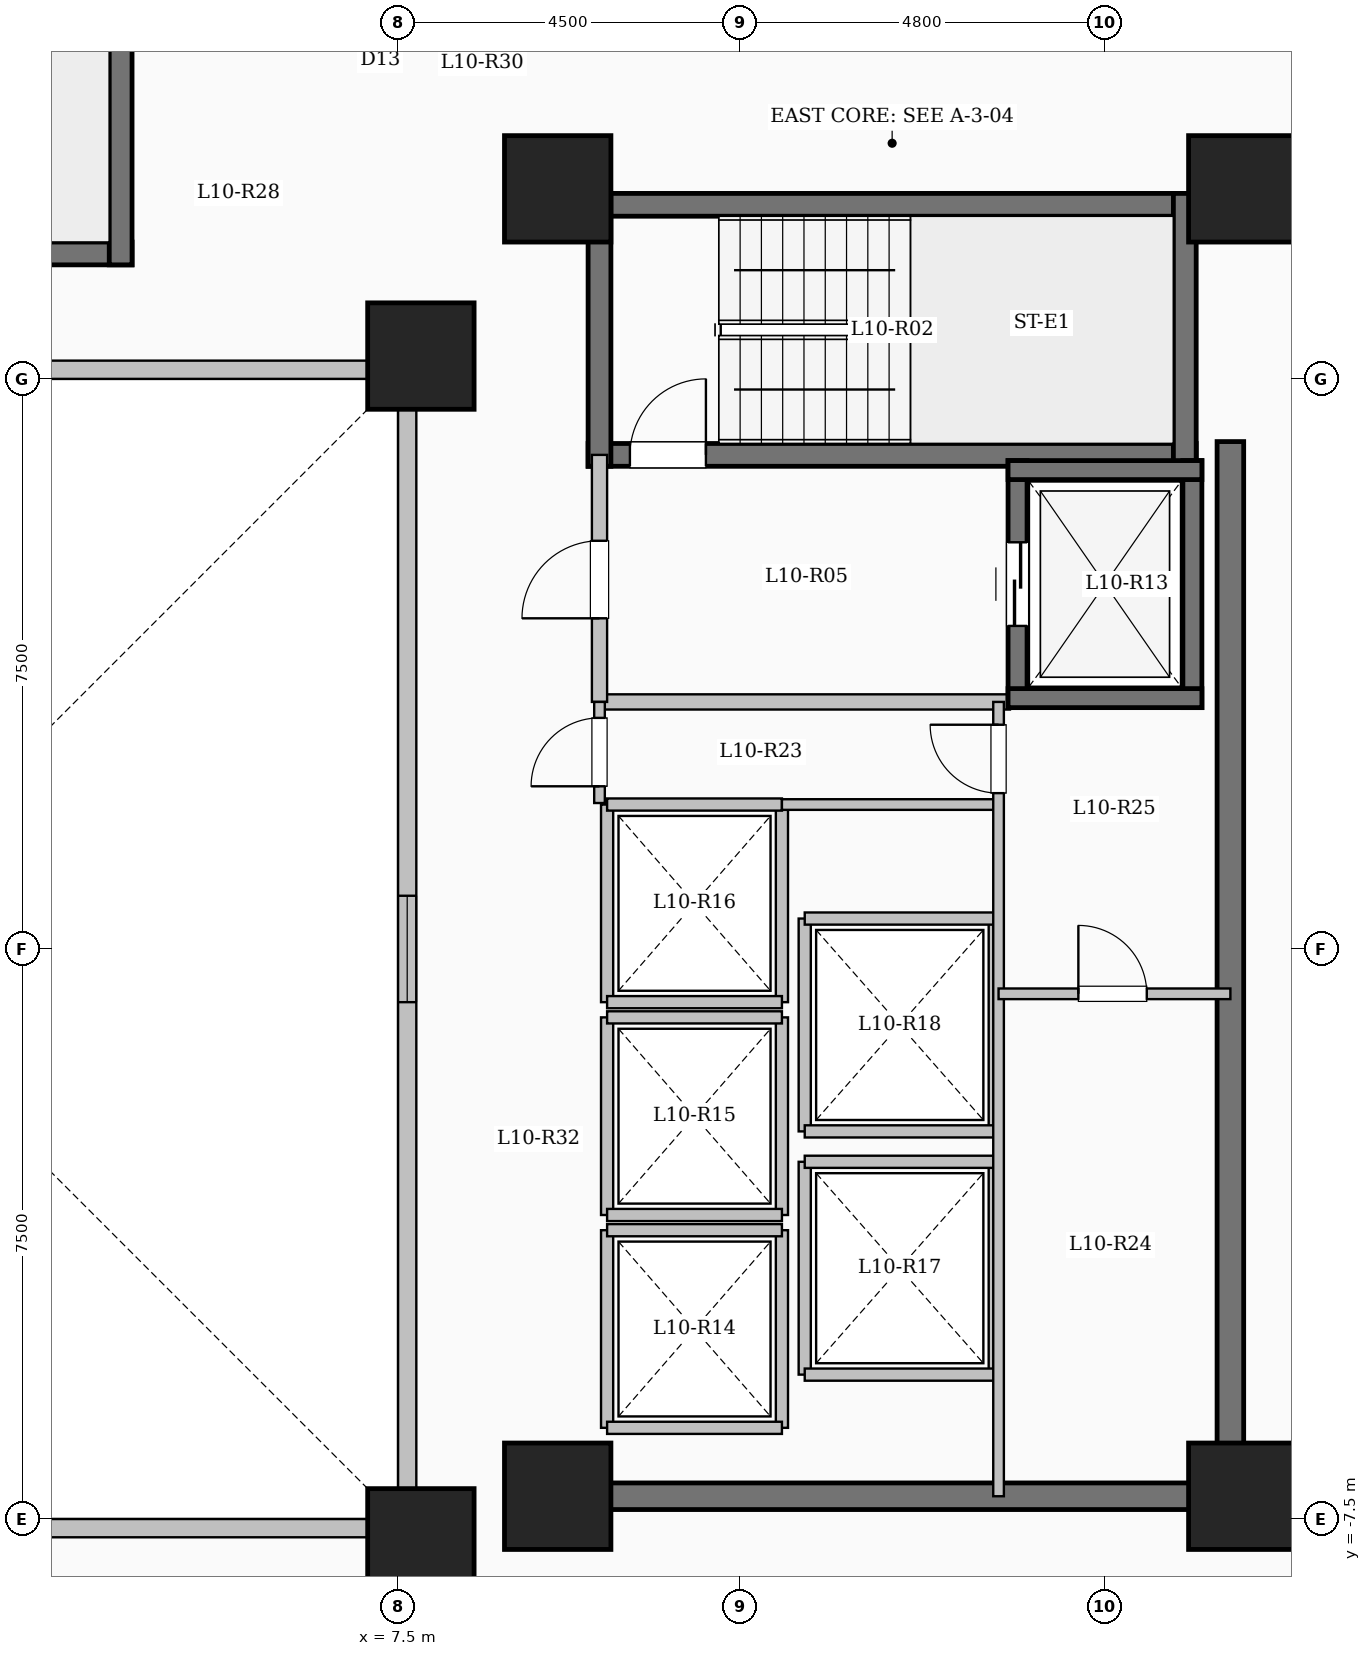
"""IFC4 building model, lengths in metres.
Left out: names, types, materials, properties, quantities, classifications, styles, units other than length and angle.
Written with IfcOpenShell. Run it as: python <this file> out.ifc"""

import sys

from ifc_helpers import new_model, si_unit, direction, frame, frame_2d, origin, origin_2d, place, context, subcontext, project, spatial, rectangle, extrude, element, fill, save


model = new_model("IFC4")
c1 = context("Model", 3, precision=1e-05, world=origin(), true_north=direction((0.0, 1.0)))
c2 = subcontext(c1, "Body", "Model", "MODEL_VIEW")
j1 = project(units=[si_unit("LENGTHUNIT", "METRE"), si_unit("PLANEANGLEUNIT", "RADIAN")], contexts=[c1])
p1 = place(None, origin())
s1 = spatial("IfcSite", under=j1, at=p1, CompositionType="ELEMENT")
p2 = place(p1, origin())
s2 = spatial("IfcBuilding", under=s1, at=p2, CompositionType="ELEMENT")
p3 = place(p2, frame((0.0, 0.0, 40.75)))
s3 = spatial("IfcBuildingStorey", under=s2, at=p3, CompositionType="ELEMENT", Elevation=40.75)
for number, where, z_axis, x_axis in (
    (1, (7.8, -7.8, 0.0), (0.0, 0.0, 1.0), (1.0, 0.0, 0.0)),
    (2, (7.8, 7.8, 0.0), (0.0, 0.0, 1.0), (1.0, 0.0, 0.0)),
    (3, (9.6, -7.2, 0.0), (0.0, 0.0, 1.0), (1.0, 0.0, 0.0)),
    (4, (9.6, 10.0, 0.0), (0.0, 0.0, 1.0), (1.0, 0.0, 0.0)),
    (5, (18.6, -7.2, 0.0), (0.0, 0.0, 1.0), (1.0, 0.0, 0.0)),
    (6, (18.6, 10.0, 0.0), (0.0, 0.0, 1.0), (1.0, 0.0, 0.0)),
):
    element("IfcColumn", number, at=place(p3, frame(where, z_axis=z_axis, x_axis=x_axis)), inside=s3, PredefinedType="COLUMN", context=c2, shape_type="SweptSolid", body=[
        extrude(rectangle(XDim=1.4, YDim=1.4, at=origin_2d()), origin(), (0.0, 0.0, 1.0), 3.35),
    ])
p4 = place(p3, frame((-7.62, -7.62, 0.0), z_axis=(0.0, 0.0, 1.0), x_axis=(1.0, 0.0, 0.0)))
e7 = element("IfcWall", 7, at=p4, inside=s3, PredefinedType="SOLIDWALL", context=c2, shape_type="SweptSolid", body=[
    extrude(rectangle(XDim=15.24, YDim=0.24, at=frame_2d((7.62, 0.0))), origin(), (0.0, 0.0, 1.0), 3.1),
])
p5 = place(p4, frame((6.92, 0.0, 0.95)))
e8 = element("IfcOpeningElement", 8, at=p5, cuts=e7, PredefinedType="OPENING", context=c2, shape_type="SweptSolid", body=[
    extrude(rectangle(XDim=1.4, YDim=1.5, at=frame_2d((0.7, 0.75))), frame((0.0, 0.13, 0.0), z_axis=(0.0, -1.0, 0.0), x_axis=(1.0, 0.0, 0.0)), (0.0, 0.0, 1.0), 0.26),
])
p6 = place(p3, frame((7.62, -7.62, 0.0), z_axis=(0.0, 0.0, 1.0), x_axis=(0.0, 1.0, 0.0)))
e9 = element("IfcWall", 9, at=p6, inside=s3, PredefinedType="SOLIDWALL", context=c2, shape_type="SweptSolid", body=[
    extrude(rectangle(XDim=15.24, YDim=0.24, at=frame_2d((7.62, 0.0))), origin(), (0.0, 0.0, 1.0), 3.1),
])
p7 = place(p6, frame((6.92, 0.0, 0.95)))
e10 = element("IfcOpeningElement", 10, at=p7, cuts=e9, PredefinedType="OPENING", context=c2, shape_type="SweptSolid", body=[
    extrude(rectangle(XDim=1.4, YDim=1.5, at=frame_2d((0.7, 0.75))), frame((0.0, 0.13, 0.0), z_axis=(0.0, -1.0, 0.0), x_axis=(1.0, 0.0, 0.0)), (0.0, 0.0, 1.0), 0.26),
])
p8 = place(p3, frame((7.62, 7.62, 0.0), z_axis=(0.0, 0.0, 1.0), x_axis=(-1.0, 0.0, 0.0)))
e11 = element("IfcWall", 11, at=p8, inside=s3, PredefinedType="SOLIDWALL", context=c2, shape_type="SweptSolid", body=[
    extrude(rectangle(XDim=15.24, YDim=0.24, at=frame_2d((7.62, 0.0))), origin(), (0.0, 0.0, 1.0), 3.1),
])
p9 = place(p8, frame((6.92, 0.0, 0.95)))
e12 = element("IfcOpeningElement", 12, at=p9, cuts=e11, PredefinedType="OPENING", context=c2, shape_type="SweptSolid", body=[
    extrude(rectangle(XDim=1.4, YDim=1.5, at=frame_2d((0.7, 0.75))), frame((0.0, 0.13, 0.0), z_axis=(0.0, -1.0, 0.0), x_axis=(1.0, 0.0, 0.0)), (0.0, 0.0, 1.0), 0.26),
])
p10 = place(p3, frame((10.0, 9.79, 0.0), z_axis=(0.0, 0.0, 1.0), x_axis=(1.0, 0.0, 0.0)))
e13 = element("IfcWall", 13, at=p10, inside=s3, PredefinedType="SHEAR", context=c2, shape_type="SweptSolid", body=[
    extrude(rectangle(XDim=8.0, YDim=0.3, at=frame_2d((4.0, 0.0))), origin(), (0.0, 0.0, 1.0), 3.35),
])
p11 = place(p3, frame((10.0, 6.5, 0.0), z_axis=(0.0, 0.0, 1.0), x_axis=(1.0, 0.0, 0.0)))
e14 = element("IfcWall", 14, at=p11, inside=s3, PredefinedType="SHEAR", context=c2, shape_type="SweptSolid", body=[
    extrude(rectangle(XDim=8.0, YDim=0.3, at=frame_2d((4.0, 0.0))), origin(), (0.0, 0.0, 1.0), 3.35),
])
p12 = place(p11, frame((0.55, 0.0, 0.0)))
e15 = element("IfcOpeningElement", 15, at=p12, cuts=e14, PredefinedType="OPENING", context=c2, shape_type="SweptSolid", body=[
    extrude(rectangle(XDim=1.0, YDim=2.15, at=frame_2d((0.5, 1.075))), frame((0.0, 0.16, 0.0), z_axis=(0.0, -1.0, 0.0), x_axis=(1.0, 0.0, 0.0)), (0.0, 0.0, 1.0), 0.32),
])
for number, where, z_axis, x_axis in (
    (16, (10.15, 6.35, 0.0), (0.0, 0.0, 1.0), (0.0, 1.0, 0.0)),
    (17, (17.85, 6.35, 0.0), (0.0, 0.0, 1.0), (0.0, 1.0, 0.0)),
):
    element("IfcWall", number, at=place(p3, frame(where, z_axis=z_axis, x_axis=x_axis)), inside=s3, PredefinedType="SHEAR", context=c2, shape_type="SweptSolid", body=[
        extrude(rectangle(XDim=3.59, YDim=0.3, at=frame_2d((1.795, 0.0))), origin(), (0.0, 0.0, 1.0), 3.35),
    ])
p13 = place(p3, frame((-4.0, 9.15, 0.0), z_axis=(0.0, 0.0, 1.0), x_axis=(1.0, 0.0, 0.0)))
e18 = element("IfcWall", 18, at=p13, inside=s3, PredefinedType="SHEAR", context=c2, shape_type="SweptSolid", body=[
    extrude(rectangle(XDim=8.0, YDim=0.3, at=frame_2d((4.0, 0.0))), origin(), (0.0, 0.0, 1.0), 3.35),
])
p14 = place(p13, frame((0.55, 0.0, 0.0)))
e19 = element("IfcOpeningElement", 19, at=p14, cuts=e18, PredefinedType="OPENING", context=c2, shape_type="SweptSolid", body=[
    extrude(rectangle(XDim=1.0, YDim=2.15, at=frame_2d((0.5, 1.075))), frame((0.0, 0.16, 0.0), z_axis=(0.0, -1.0, 0.0), x_axis=(1.0, 0.0, 0.0)), (0.0, 0.0, 1.0), 0.32),
])
p15 = place(p3, frame((3.85, 9.0, 0.0), z_axis=(0.0, 0.0, 1.0), x_axis=(0.0, 1.0, 0.0)))
e20 = element("IfcWall", 20, at=p15, inside=s3, PredefinedType="SHEAR", context=c2, shape_type="SweptSolid", body=[
    extrude(rectangle(XDim=3.59, YDim=0.3, at=frame_2d((1.795, 0.0))), origin(), (0.0, 0.0, 1.0), 3.35),
])
p16 = place(p3, frame((10.15, 3.25, 0.0), z_axis=(0.0, 0.0, 1.0), x_axis=(1.0, 0.0, 0.0)))
e21 = element("IfcWall", 21, at=p16, inside=s3, PredefinedType="SOLIDWALL", context=c2, shape_type="SweptSolid", body=[
    extrude(rectangle(XDim=5.4, YDim=0.2, at=frame_2d((2.7, 0.0))), origin(), (0.0, 0.0, 1.0), 3.1),
])
p17 = place(p3, frame((10.15, 3.25, 0.0), z_axis=(0.0, 0.0, 1.0), x_axis=(0.0, 1.0, 0.0)))
e22 = element("IfcWall", 22, at=p17, inside=s3, PredefinedType="SOLIDWALL", context=c2, shape_type="SweptSolid", body=[
    extrude(rectangle(XDim=3.25, YDim=0.2, at=frame_2d((1.625, 0.0))), origin(), (0.0, 0.0, 1.0), 3.1),
])
p18 = place(p17, frame((1.1, 0.0, 0.0)))
e23 = element("IfcOpeningElement", 23, at=p18, cuts=e22, PredefinedType="OPENING", context=c2, shape_type="SweptSolid", body=[
    extrude(rectangle(XDim=1.02, YDim=2.15, at=frame_2d((0.51, 1.075))), frame((0.0, 0.11, 0.0), z_axis=(0.0, -1.0, 0.0), x_axis=(1.0, 0.0, 0.0)), (0.0, 0.0, 1.0), 0.22),
])
p19 = place(p3, frame((15.65, 3.175, 0.0), z_axis=(0.0, 0.0, 1.0), x_axis=(0.0, 1.0, 0.0)))
e24 = element("IfcWall", 24, at=p19, inside=s3, PredefinedType="SHEAR", context=c2, shape_type="SweptSolid", body=[
    extrude(rectangle(XDim=3.25, YDim=0.25, at=frame_2d((1.625, 0.0))), origin(), (0.0, 0.0, 1.0), 3.35),
])
p20 = place(p19, frame((1.075, 0.0, 0.0)))
e25 = element("IfcOpeningElement", 25, at=p20, cuts=e24, PredefinedType="OPENING", context=c2, shape_type="SweptSolid", body=[
    extrude(rectangle(XDim=1.1, YDim=2.15, at=frame_2d((0.55, 1.075))), frame((0.0, 0.135, 0.0), z_axis=(0.0, -1.0, 0.0), x_axis=(1.0, 0.0, 0.0)), (0.0, 0.0, 1.0), 0.27),
])
p21 = place(p3, frame((17.95, 3.175, 0.0), z_axis=(0.0, 0.0, 1.0), x_axis=(0.0, 1.0, 0.0)))
e26 = element("IfcWall", 26, at=p21, inside=s3, PredefinedType="SHEAR", context=c2, shape_type="SweptSolid", body=[
    extrude(rectangle(XDim=3.25, YDim=0.25, at=frame_2d((1.625, 0.0))), origin(), (0.0, 0.0, 1.0), 3.35),
])
for number, where, z_axis, x_axis in (
    (27, (15.525, 3.3, 0.0), (0.0, 0.0, 1.0), (1.0, 0.0, 0.0)),
    (28, (15.525, 6.3, 0.0), (0.0, 0.0, 1.0), (1.0, 0.0, 0.0)),
):
    element("IfcWall", number, at=place(p3, frame(where, z_axis=z_axis, x_axis=x_axis)), inside=s3, PredefinedType="SHEAR", context=c2, shape_type="SweptSolid", body=[
        extrude(rectangle(XDim=2.55, YDim=0.25, at=frame_2d((1.275, 0.0))), origin(), (0.0, 0.0, 1.0), 3.35),
    ])
for number, where, z_axis, x_axis in (
    (29, (10.25, -6.3, 0.0), (0.0, 0.0, 1.0), (0.0, 1.0, 0.0)),
    (30, (12.55, -6.3, 0.0), (0.0, 0.0, 1.0), (0.0, 1.0, 0.0)),
):
    element("IfcWall", number, at=place(p3, frame(where, z_axis=z_axis, x_axis=x_axis)), inside=s3, PredefinedType="SOLIDWALL", context=c2, shape_type="SweptSolid", body=[
        extrude(rectangle(XDim=2.6, YDim=0.16, at=frame_2d((1.3, 0.0))), origin(), (0.0, 0.0, 1.0), 3.1),
    ])
for number, where, z_axis, x_axis in (
    (31, (10.25, -6.3, 0.0), (0.0, 0.0, 1.0), (1.0, 0.0, 0.0)),
    (32, (10.25, -3.7, 0.0), (0.0, 0.0, 1.0), (1.0, 0.0, 0.0)),
):
    element("IfcWall", number, at=place(p3, frame(where, z_axis=z_axis, x_axis=x_axis)), inside=s3, PredefinedType="SOLIDWALL", context=c2, shape_type="SweptSolid", body=[
        extrude(rectangle(XDim=2.3, YDim=0.16, at=frame_2d((1.15, 0.0))), origin(), (0.0, 0.0, 1.0), 3.1),
    ])
for number, where, z_axis, x_axis in (
    (33, (10.25, -3.5, 0.0), (0.0, 0.0, 1.0), (0.0, 1.0, 0.0)),
    (34, (12.55, -3.5, 0.0), (0.0, 0.0, 1.0), (0.0, 1.0, 0.0)),
):
    element("IfcWall", number, at=place(p3, frame(where, z_axis=z_axis, x_axis=x_axis)), inside=s3, PredefinedType="SOLIDWALL", context=c2, shape_type="SweptSolid", body=[
        extrude(rectangle(XDim=2.6, YDim=0.16, at=frame_2d((1.3, 0.0))), origin(), (0.0, 0.0, 1.0), 3.1),
    ])
for number, where, z_axis, x_axis in (
    (35, (10.25, -3.5, 0.0), (0.0, 0.0, 1.0), (1.0, 0.0, 0.0)),
    (36, (10.25, -0.9, 0.0), (0.0, 0.0, 1.0), (1.0, 0.0, 0.0)),
):
    element("IfcWall", number, at=place(p3, frame(where, z_axis=z_axis, x_axis=x_axis)), inside=s3, PredefinedType="SOLIDWALL", context=c2, shape_type="SweptSolid", body=[
        extrude(rectangle(XDim=2.3, YDim=0.16, at=frame_2d((1.15, 0.0))), origin(), (0.0, 0.0, 1.0), 3.1),
    ])
for number, where, z_axis, x_axis in (
    (37, (10.25, -0.7, 0.0), (0.0, 0.0, 1.0), (0.0, 1.0, 0.0)),
    (38, (12.55, -0.7, 0.0), (0.0, 0.0, 1.0), (0.0, 1.0, 0.0)),
):
    element("IfcWall", number, at=place(p3, frame(where, z_axis=z_axis, x_axis=x_axis)), inside=s3, PredefinedType="SOLIDWALL", context=c2, shape_type="SweptSolid", body=[
        extrude(rectangle(XDim=2.6, YDim=0.16, at=frame_2d((1.3, 0.0))), origin(), (0.0, 0.0, 1.0), 3.1),
    ])
for number, where, z_axis, x_axis in (
    (39, (10.25, -0.7, 0.0), (0.0, 0.0, 1.0), (1.0, 0.0, 0.0)),
    (40, (10.25, 1.9, 0.0), (0.0, 0.0, 1.0), (1.0, 0.0, 0.0)),
):
    element("IfcWall", number, at=place(p3, frame(where, z_axis=z_axis, x_axis=x_axis)), inside=s3, PredefinedType="SOLIDWALL", context=c2, shape_type="SweptSolid", body=[
        extrude(rectangle(XDim=2.3, YDim=0.16, at=frame_2d((1.15, 0.0))), origin(), (0.0, 0.0, 1.0), 3.1),
    ])
for number, where, z_axis, x_axis in (
    (41, (12.85, -5.6, 0.0), (0.0, 0.0, 1.0), (0.0, 1.0, 0.0)),
    (42, (15.35, -5.6, 0.0), (0.0, 0.0, 1.0), (0.0, 1.0, 0.0)),
):
    element("IfcWall", number, at=place(p3, frame(where, z_axis=z_axis, x_axis=x_axis)), inside=s3, PredefinedType="SOLIDWALL", context=c2, shape_type="SweptSolid", body=[
        extrude(rectangle(XDim=2.8, YDim=0.16, at=frame_2d((1.4, 0.0))), origin(), (0.0, 0.0, 1.0), 3.1),
    ])
for number, where, z_axis, x_axis in (
    (43, (12.85, -5.6, 0.0), (0.0, 0.0, 1.0), (1.0, 0.0, 0.0)),
    (44, (12.85, -2.8, 0.0), (0.0, 0.0, 1.0), (1.0, 0.0, 0.0)),
):
    element("IfcWall", number, at=place(p3, frame(where, z_axis=z_axis, x_axis=x_axis)), inside=s3, PredefinedType="SOLIDWALL", context=c2, shape_type="SweptSolid", body=[
        extrude(rectangle(XDim=2.5, YDim=0.16, at=frame_2d((1.25, 0.0))), origin(), (0.0, 0.0, 1.0), 3.1),
    ])
for number, where, z_axis, x_axis in (
    (45, (12.85, -2.4, 0.0), (0.0, 0.0, 1.0), (0.0, 1.0, 0.0)),
    (46, (15.35, -2.4, 0.0), (0.0, 0.0, 1.0), (0.0, 1.0, 0.0)),
):
    element("IfcWall", number, at=place(p3, frame(where, z_axis=z_axis, x_axis=x_axis)), inside=s3, PredefinedType="SOLIDWALL", context=c2, shape_type="SweptSolid", body=[
        extrude(rectangle(XDim=2.8, YDim=0.16, at=frame_2d((1.4, 0.0))), origin(), (0.0, 0.0, 1.0), 3.1),
    ])
for number, where, z_axis, x_axis in (
    (47, (12.85, -2.4, 0.0), (0.0, 0.0, 1.0), (1.0, 0.0, 0.0)),
    (48, (12.85, 0.4, 0.0), (0.0, 0.0, 1.0), (1.0, 0.0, 0.0)),
):
    element("IfcWall", number, at=place(p3, frame(where, z_axis=z_axis, x_axis=x_axis)), inside=s3, PredefinedType="SOLIDWALL", context=c2, shape_type="SweptSolid", body=[
        extrude(rectangle(XDim=2.5, YDim=0.16, at=frame_2d((1.25, 0.0))), origin(), (0.0, 0.0, 1.0), 3.1),
    ])
p22 = place(p3, frame((18.45, -7.375, 0.0), z_axis=(0.0, 0.0, 1.0), x_axis=(0.0, 1.0, 0.0)))
e49 = element("IfcWall", 49, at=p22, inside=s3, PredefinedType="SHEAR", context=c2, shape_type="SweptSolid", body=[
    extrude(rectangle(XDim=14.05, YDim=0.35, at=frame_2d((7.025, 0.0))), origin(), (0.0, 0.0, 1.0), 3.35),
])
p23 = place(p3, frame((10.075, -7.2, 0.0), z_axis=(0.0, 0.0, 1.0), x_axis=(1.0, 0.0, 0.0)))
e50 = element("IfcWall", 50, at=p23, inside=s3, PredefinedType="SHEAR", context=c2, shape_type="SweptSolid", body=[
    extrude(rectangle(XDim=8.55, YDim=0.35, at=frame_2d((4.275, 0.0))), origin(), (0.0, 0.0, 1.0), 3.35),
])
p24 = place(p3, frame((12.55, 1.9, 0.0), z_axis=(0.0, 0.0, 1.0), x_axis=(1.0, 0.0, 0.0)))
e51 = element("IfcWall", 51, at=p24, inside=s3, PredefinedType="PARTITIONING", context=c2, shape_type="SweptSolid", body=[
    extrude(rectangle(XDim=2.85, YDim=0.14, at=frame_2d((1.425, 0.0))), origin(), (0.0, 0.0, 1.0), 3.1),
])
p25 = place(p3, frame((10.15, 1.92, 0.0), z_axis=(0.0, 0.0, 1.0), x_axis=(0.0, 1.0, 0.0)))
e52 = element("IfcWall", 52, at=p25, inside=s3, PredefinedType="PARTITIONING", context=c2, shape_type="SweptSolid", body=[
    extrude(rectangle(XDim=1.33, YDim=0.14, at=frame_2d((0.665, 0.0))), origin(), (0.0, 0.0, 1.0), 3.1),
])
p26 = place(p25, frame((0.22, 0.0, 0.0)))
e53 = element("IfcOpeningElement", 53, at=p26, cuts=e52, PredefinedType="OPENING", context=c2, shape_type="SweptSolid", body=[
    extrude(rectangle(XDim=0.9, YDim=2.08, at=frame_2d((0.45, 1.04))), frame((0.0, 0.08, 0.0), z_axis=(0.0, -1.0, 0.0), x_axis=(1.0, 0.0, 0.0)), (0.0, 0.0, 1.0), 0.16),
])
p27 = place(p3, frame((15.4, -7.2, 0.0), z_axis=(0.0, 0.0, 1.0), x_axis=(0.0, 1.0, 0.0)))
e54 = element("IfcWall", 54, at=p27, inside=s3, PredefinedType="PARTITIONING", context=c2, shape_type="SweptSolid", body=[
    extrude(rectangle(XDim=10.45, YDim=0.14, at=frame_2d((5.225, 0.0))), origin(), (0.0, 0.0, 1.0), 3.1),
])
p28 = place(p27, frame((9.25, 0.0, 0.0)))
e55 = element("IfcOpeningElement", 55, at=p28, cuts=e54, PredefinedType="OPENING", context=c2, shape_type="SweptSolid", body=[
    extrude(rectangle(XDim=0.9, YDim=2.08, at=frame_2d((0.45, 1.04))), frame((0.0, 0.08, 0.0), z_axis=(0.0, -1.0, 0.0), x_axis=(1.0, 0.0, 0.0)), (0.0, 0.0, 1.0), 0.16),
])
p29 = place(p3, frame((15.4, -0.59, 0.0), z_axis=(0.0, 0.0, 1.0), x_axis=(1.0, 0.0, 0.0)))
e56 = element("IfcWall", 56, at=p29, inside=s3, PredefinedType="PARTITIONING", context=c2, shape_type="SweptSolid", body=[
    extrude(rectangle(XDim=3.05, YDim=0.14, at=frame_2d((1.525, 0.0))), origin(), (0.0, 0.0, 1.0), 3.1),
])
p30 = place(p29, frame((1.05, 0.0, 0.0)))
e57 = element("IfcOpeningElement", 57, at=p30, cuts=e56, PredefinedType="OPENING", context=c2, shape_type="SweptSolid", body=[
    extrude(rectangle(XDim=0.9, YDim=2.08, at=frame_2d((0.45, 1.04))), frame((0.0, 0.08, 0.0), z_axis=(0.0, -1.0, 0.0), x_axis=(1.0, 0.0, 0.0)), (0.0, 0.0, 1.0), 0.16),
])
p31 = place(p7, origin())
e58 = element("IfcWindow", 58, at=p31, inside=s3, PartitioningType="SINGLE_PANEL", PredefinedType="WINDOW", context=c2, shape_type="SweptSolid", body=[
    extrude(rectangle(XDim=1.4, YDim=1.5, at=frame_2d((0.7, 0.75))), frame((0.0, 0.03, 0.0), z_axis=(0.0, -1.0, 0.0), x_axis=(1.0, 0.0, 0.0)), (0.0, 0.0, 1.0), 0.06),
])
fill(e10, e58)
p32 = place(p12, origin())
e59 = element("IfcDoor", 59, at=p32, inside=s3, OperationType="SINGLE_SWING_RIGHT", PredefinedType="DOOR", context=c2, shape_type="SweptSolid", body=[
    extrude(rectangle(XDim=1.0, YDim=2.15, at=frame_2d((0.5, 1.075))), frame((0.0, 0.025, 0.0), z_axis=(0.0, -1.0, 0.0), x_axis=(1.0, 0.0, 0.0)), (0.0, 0.0, 1.0), 0.05),
])
fill(e15, e59)
p33 = place(p18, origin())
e60 = element("IfcDoor", 60, at=p33, inside=s3, OperationType="SINGLE_SWING_LEFT", PredefinedType="DOOR", context=c2, shape_type="SweptSolid", body=[
    extrude(rectangle(XDim=1.02, YDim=2.15, at=frame_2d((0.51, 1.075))), frame((0.0, 0.025, 0.0), z_axis=(0.0, -1.0, 0.0), x_axis=(1.0, 0.0, 0.0)), (0.0, 0.0, 1.0), 0.05),
])
fill(e23, e60)
p34 = place(p20, origin())
e61 = element("IfcDoor", 61, at=p34, inside=s3, OperationType="SLIDING_TO_LEFT", PredefinedType="DOOR", context=c2, shape_type="SweptSolid", body=[
    extrude(rectangle(XDim=1.1, YDim=2.15, at=frame_2d((0.55, 1.075))), frame((0.0, 0.025, 0.0), z_axis=(0.0, -1.0, 0.0), x_axis=(1.0, 0.0, 0.0)), (0.0, 0.0, 1.0), 0.05),
])
fill(e25, e61)
p35 = place(p26, origin())
e62 = element("IfcDoor", 62, at=p35, inside=s3, OperationType="SINGLE_SWING_LEFT", PredefinedType="DOOR", context=c2, shape_type="SweptSolid", body=[
    extrude(rectangle(XDim=0.9, YDim=2.08, at=frame_2d((0.45, 1.04))), frame((0.0, 0.025, 0.0), z_axis=(0.0, -1.0, 0.0), x_axis=(1.0, 0.0, 0.0)), (0.0, 0.0, 1.0), 0.05),
])
fill(e53, e62)
p36 = place(p28, origin())
e63 = element("IfcDoor", 63, at=p36, inside=s3, OperationType="SINGLE_SWING_RIGHT", PredefinedType="DOOR", context=c2, shape_type="SweptSolid", body=[
    extrude(rectangle(XDim=0.9, YDim=2.08, at=frame_2d((0.45, 1.04))), frame((0.0, 0.025, 0.0), z_axis=(0.0, -1.0, 0.0), x_axis=(1.0, 0.0, 0.0)), (0.0, 0.0, 1.0), 0.05),
])
fill(e55, e63)
p37 = place(p30, origin())
e64 = element("IfcDoor", 64, at=p37, inside=s3, OperationType="SINGLE_SWING_LEFT", PredefinedType="DOOR", context=c2, shape_type="SweptSolid", body=[
    extrude(rectangle(XDim=0.9, YDim=2.08, at=frame_2d((0.45, 1.04))), frame((0.0, 0.025, 0.0), z_axis=(0.0, -1.0, 0.0), x_axis=(1.0, 0.0, 0.0)), (0.0, 0.0, 1.0), 0.05),
])
fill(e57, e64)
save(model, sys.argv[1])
